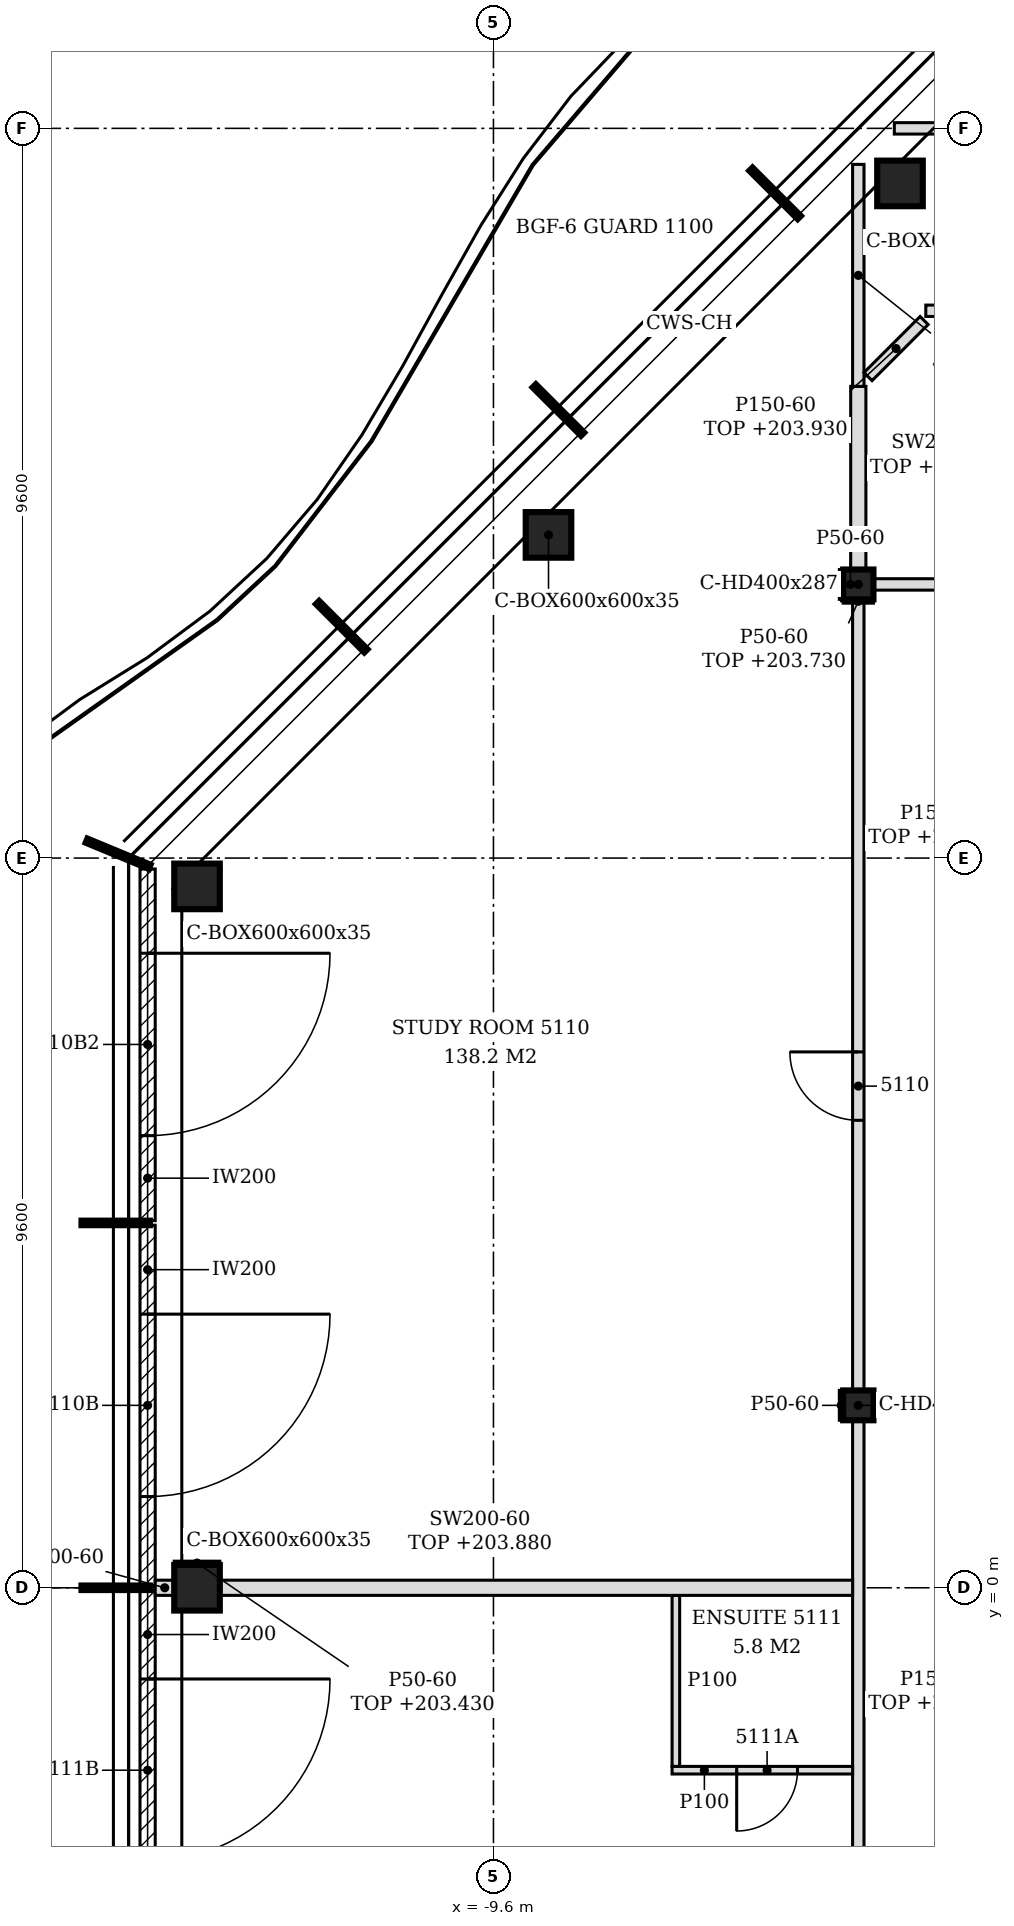
"""IFC4 building model, lengths in metres.
Left out: names, types, materials, properties, quantities, classifications, styles, units other than length and angle.
Written with IfcOpenShell. Run it as: python <this file> out.ifc"""

import sys

from ifc_helpers import new_model, si_unit, direction, frame, frame_2d, origin, origin_2d, place, context, subcontext, project, spatial, polyline, rectangle, hollow_rectangle, i_section, outline, extrude, clip, halfspace, element, fill, save


model = new_model("IFC4")
c1 = context("Model", 3, precision=1e-05, world=origin(), true_north=direction((0.0, 1.0)))
c2 = subcontext(c1, "Body", "Model", "MODEL_VIEW")
j1 = project(units=[si_unit("LENGTHUNIT", "METRE"), si_unit("PLANEANGLEUNIT", "RADIAN")], contexts=[c1])
p1 = place(None, origin())
s1 = spatial("IfcSite", under=j1, at=p1, CompositionType="ELEMENT")
p2 = place(p1, origin())
s2 = spatial("IfcBuilding", under=s1, at=p2, CompositionType="ELEMENT")
p3 = place(p2, frame((0.0, 0.0, 201.0)))
s3 = spatial("IfcBuildingStorey", under=s2, at=p3, CompositionType="ELEMENT", Elevation=201.0)
for number, where, z_axis, x_axis in (
    (1, (-4.251, 18.476, -0.15), (0.0, 0.0, 1.0), (1.0, 0.0, 0.0)),
    (2, (-8.876, 13.852, -0.15), (0.0, 0.0, 1.0), (1.0, 0.0, 0.0)),
    (3, (-13.5, 9.227, -0.15), (0.0, 0.0, 1.0), (1.0, 0.0, 0.0)),
):
    element("IfcColumn", number, at=place(p3, frame(where, z_axis=z_axis, x_axis=x_axis)), inside=s3, PredefinedType="COLUMN", context=c2, shape_type="Clipping", body=[
        clip(clip(extrude(hollow_rectangle(XDim=0.6, YDim=0.6, WallThickness=0.035, at=origin_2d()), origin(), (0.0, 0.0, 1.0), 3.5), halfspace(frame((0.0, 0.0, 0.011), z_axis=(0.0, 0.0, 1.0), x_axis=(1.0, 0.0, 0.0)), True)), halfspace(frame((0.0, 0.0, 3.095), z_axis=(0.0, 0.0, 1.0), x_axis=(1.0, 0.0, 0.0)), False)),
    ])
p4 = place(p3, frame((-13.5, 0.0, -0.15), z_axis=(0.0, 0.0, 1.0), x_axis=(1.0, 0.0, 0.0)))
e4 = element("IfcColumn", 4, at=p4, inside=s3, PredefinedType="COLUMN", context=c2, shape_type="Clipping", body=[
    clip(extrude(hollow_rectangle(XDim=0.6, YDim=0.6, WallThickness=0.035, at=origin_2d()), origin(), (0.0, 0.0, 1.0), 3.5), halfspace(frame((0.0, 0.0, 0.011), z_axis=(0.0, 0.0, 1.0), x_axis=(1.0, 0.0, 0.0)), True)),
])
for number, where, z_axis, x_axis in (
    (5, (-4.8, 2.4, -0.15), (0.0, 0.0, 1.0), (1.0, 0.0, 0.0)),
    (6, (-4.8, 13.2, -0.15), (0.0, 0.0, 1.0), (1.0, 0.0, 0.0)),
):
    element("IfcColumn", number, at=place(p3, frame(where, z_axis=z_axis, x_axis=x_axis)), inside=s3, PredefinedType="COLUMN", context=c2, shape_type="SweptSolid", body=[
        extrude(i_section(OverallWidth=0.399, OverallDepth=0.393, WebThickness=0.023, FlangeThickness=0.037, FilletRadius=0.015, at=origin_2d()), origin(), (0.0, 0.0, 1.0), 3.5),
    ])
p5 = place(p3, frame((-14.15, 9.457, 0.0), z_axis=(0.0, 0.0, 1.0), x_axis=(0.0, -1.0, 0.0)))
e7 = element("IfcWall", 7, at=p5, inside=s3, PredefinedType="NOTDEFINED", context=c2, shape_type="SweptSolid", body=[
    extrude(rectangle(XDim=4.626, YDim=0.2, at=frame_2d((2.313, 0.0))), origin(), (0.0, 0.0, 1.0), 3.35),
])
p6 = place(p5, frame((1.108, 0.0, 0.0)))
e8 = element("IfcOpeningElement", 8, at=p6, cuts=e7, PredefinedType="OPENING", context=c2, shape_type="SweptSolid", body=[
    extrude(rectangle(XDim=2.4, YDim=2.4, at=frame_2d((1.2, 1.2))), frame((0.0, 0.11, 0.0), z_axis=(0.0, -1.0, 0.0), x_axis=(1.0, 0.0, 0.0)), (0.0, 0.0, 1.0), 0.22),
])
p7 = place(p3, frame((-14.15, 4.77, 0.0), z_axis=(0.0, 0.0, 1.0), x_axis=(0.0, -1.0, 0.0)))
e9 = element("IfcWall", 9, at=p7, inside=s3, PredefinedType="NOTDEFINED", context=c2, shape_type="SweptSolid", body=[
    extrude(rectangle(XDim=4.74, YDim=0.2, at=frame_2d((2.37, 0.0))), origin(), (0.0, 0.0, 1.0), 3.35),
])
p8 = place(p7, frame((1.17, 0.0, 0.0)))
e10 = element("IfcOpeningElement", 10, at=p8, cuts=e9, PredefinedType="OPENING", context=c2, shape_type="SweptSolid", body=[
    extrude(rectangle(XDim=2.4, YDim=2.4, at=frame_2d((1.2, 1.2))), frame((0.0, 0.11, 0.0), z_axis=(0.0, -1.0, 0.0), x_axis=(1.0, 0.0, 0.0)), (0.0, 0.0, 1.0), 0.22),
])
p9 = place(p3, frame((-14.15, -0.03, 0.0), z_axis=(0.0, 0.0, 1.0), x_axis=(0.0, -1.0, 0.0)))
e11 = element("IfcWall", 11, at=p9, inside=s3, PredefinedType="NOTDEFINED", context=c2, shape_type="SweptSolid", body=[
    extrude(rectangle(XDim=4.74, YDim=0.2, at=frame_2d((2.37, 0.0))), origin(), (0.0, 0.0, 1.0), 3.35),
])
p10 = place(p9, frame((1.17, 0.0, 0.0)))
e12 = element("IfcOpeningElement", 12, at=p10, cuts=e11, PredefinedType="OPENING", context=c2, shape_type="SweptSolid", body=[
    extrude(rectangle(XDim=2.4, YDim=2.4, at=frame_2d((1.2, 1.2))), frame((0.0, 0.11, 0.0), z_axis=(0.0, -1.0, 0.0), x_axis=(1.0, 0.0, 0.0)), (0.0, 0.0, 1.0), 0.22),
])
p11 = place(p3, frame((-4.8, -8.204, 0.0), z_axis=(0.0, 0.0, 1.0), x_axis=(0.0, 1.0, 0.0)))
e13 = element("IfcWall", 13, at=p11, inside=s3, PredefinedType="PARTITIONING", context=c2, shape_type="SweptSolid", body=[
    extrude(rectangle(XDim=10.407, YDim=0.15, at=frame_2d((5.204, 0.0))), origin(), (0.0, 0.0, 1.0), 2.73),
])
p12 = place(p11, frame((2.354, 0.0, 0.0)))
e14 = element("IfcOpeningElement", 14, at=p12, cuts=e13, PredefinedType="OPENING", context=c2, shape_type="SweptSolid", body=[
    extrude(rectangle(XDim=0.9, YDim=2.1, at=frame_2d((0.45, 1.05))), frame((0.0, 0.085, 0.0), z_axis=(0.0, -1.0, 0.0), x_axis=(1.0, 0.0, 0.0)), (0.0, 0.0, 1.0), 0.17),
])
p13 = place(p3, frame((-7.25, -2.4, 0.0), z_axis=(0.0, 0.0, 1.0), x_axis=(1.0, 0.0, 0.0)))
e15 = element("IfcWall", 15, at=p13, inside=s3, PredefinedType="PARTITIONING", context=c2, shape_type="SweptSolid", body=[
    extrude(outline(polyline([(0.0, 0.0), (2.375, 0.0), (2.375, 2.73), (2.3, 2.73), (2.298, 3.35), (0.0, 3.35), (0.0, 0.0)])), frame((0.0, 0.05, 0.0), z_axis=(0.0, -1.0, 0.0), x_axis=(1.0, 0.0, 0.0)), (0.0, 0.0, 1.0), 0.1),
])
p14 = place(p13, frame((0.85, 0.0, 0.0)))
e16 = element("IfcOpeningElement", 16, at=p14, cuts=e15, PredefinedType="OPENING", context=c2, shape_type="SweptSolid", body=[
    extrude(rectangle(XDim=0.8, YDim=2.1, at=frame_2d((0.4, 1.05))), frame((0.0, 0.06, 0.0), z_axis=(0.0, -1.0, 0.0), x_axis=(1.0, 0.0, 0.0)), (0.0, 0.0, 1.0), 0.12),
])
p15 = place(p3, frame((-7.2, -2.35, 0.0), z_axis=(0.0, 0.0, 1.0), x_axis=(0.0, 1.0, 0.0)))
e17 = element("IfcWall", 17, at=p15, inside=s3, PredefinedType="PARTITIONING", context=c2, shape_type="SweptSolid", body=[
    extrude(rectangle(XDim=2.25, YDim=0.1, at=frame_2d((1.125, 0.0))), origin(), (0.0, 0.0, 1.0), 3.35),
])
p16 = place(p3, frame((-14.05, 0.0, 0.0), z_axis=(0.0, 0.0, 1.0), x_axis=(1.0, 0.0, 0.0)))
e18 = element("IfcWall", 18, at=p16, inside=s3, PredefinedType="PARTITIONING", context=c2, shape_type="SweptSolid", body=[
    extrude(outline(polyline([(0.0, 0.0), (0.25, 0.0), (0.25, 2.43), (0.1, 2.43), (0.098, 3.35), (0.0, 3.35), (0.0, 0.0)])), frame((0.0, 0.1, 0.0), z_axis=(0.0, -1.0, 0.0), x_axis=(1.0, 0.0, 0.0)), (0.0, 0.0, 1.0), 0.2),
])
p17 = place(p3, frame((-13.2, 0.0, 0.0), z_axis=(0.0, 0.0, 1.0), x_axis=(1.0, 0.0, 0.0)))
e19 = element("IfcWall", 19, at=p17, inside=s3, PredefinedType="PARTITIONING", context=c2, shape_type="SweptSolid", body=[
    extrude(outline(polyline([(0.0, 0.0), (8.325, 0.0), (8.325, 2.73), (8.25, 2.73), (8.248, 2.88), (0.15, 2.88), (0.148, 2.43), (0.0, 2.43), (0.0, 0.0)])), frame((0.0, 0.1, 0.0), z_axis=(0.0, -1.0, 0.0), x_axis=(1.0, 0.0, 0.0)), (0.0, 0.0, 1.0), 0.2),
])
p18 = place(p3, frame((-4.8, 2.596, 0.0), z_axis=(0.0, 0.0, 1.0), x_axis=(0.0, 1.0, 0.0)))
e20 = element("IfcWall", 20, at=p18, inside=s3, PredefinedType="PARTITIONING", context=c2, shape_type="SweptSolid", body=[
    extrude(rectangle(XDim=10.407, YDim=0.15, at=frame_2d((5.204, 0.0))), origin(), (0.0, 0.0, 1.0), 2.73),
])
p19 = place(p18, frame((3.553, 0.0, 0.0)))
e21 = element("IfcOpeningElement", 21, at=p19, cuts=e20, PredefinedType="OPENING", context=c2, shape_type="SweptSolid", body=[
    extrude(rectangle(XDim=0.9, YDim=2.1, at=frame_2d((0.45, 1.05))), frame((0.0, 0.085, 0.0), z_axis=(0.0, -1.0, 0.0), x_axis=(1.0, 0.0, 0.0)), (0.0, 0.0, 1.0), 0.17),
])
p20 = place(p3, frame((-4.601, 13.2, 0.0), z_axis=(0.0, 0.0, 1.0), x_axis=(1.0, 0.0, 0.0)))
e22 = element("IfcWall", 22, at=p20, inside=s3, PredefinedType="PARTITIONING", context=c2, shape_type="SweptSolid", body=[
    extrude(rectangle(XDim=9.476, YDim=0.15, at=frame_2d((4.738, 0.0))), origin(), (0.0, 0.0, 1.0), 2.73),
])
p21 = place(p20, frame((4.15, 0.0, 0.0)))
e23 = element("IfcOpeningElement", 23, at=p21, cuts=e22, PredefinedType="OPENING", context=c2, shape_type="SweptSolid", body=[
    extrude(rectangle(XDim=0.9, YDim=2.1, at=frame_2d((0.45, 1.05))), frame((0.0, 0.085, 0.0), z_axis=(0.0, -1.0, 0.0), x_axis=(1.0, 0.0, 0.0)), (0.0, 0.0, 1.0), 0.17),
])
p22 = place(p3, frame((-4.8, 13.396, 0.0), z_axis=(0.0, 0.0, 1.0), x_axis=(0.0, 1.0, 0.0)))
e24 = element("IfcWall", 24, at=p22, inside=s3, PredefinedType="PARTITIONING", context=c2, shape_type="SweptSolid", body=[
    extrude(rectangle(XDim=2.409, YDim=0.2, at=frame_2d((1.205, 0.0))), origin(), (0.0, 0.0, 1.0), 2.93),
])
p23 = place(p3, frame((-4.8, 15.806, 0.0), z_axis=(0.0, 0.0, 1.0), x_axis=(0.0, 1.0, 0.0)))
e25 = element("IfcWall", 25, at=p23, inside=s3, PredefinedType="PARTITIONING", context=c2, shape_type="SweptSolid", body=[
    extrude(outline(polyline([(0.0, 0.0), (2.92, 0.0), (2.92, 2.93), (2.833, 2.93), (2.831, 2.43), (1.41, 2.43), (1.408, 2.93), (0.0, 2.93), (0.0, 0.0)])), frame((0.0, 0.075, 0.0), z_axis=(0.0, -1.0, 0.0), x_axis=(1.0, 0.0, 0.0)), (0.0, 0.0, 1.0), 0.15),
])
p24 = place(p3, frame((-4.672, 15.934, 0.0), z_axis=(0.0, 0.0, 1.0), x_axis=(0.707106781187, 0.707106781187, 0.0)))
e26 = element("IfcWall", 26, at=p24, inside=s3, PredefinedType="PARTITIONING", context=c2, shape_type="SweptSolid", body=[
    extrude(rectangle(XDim=1.044, YDim=0.15, at=frame_2d((0.522, 0.0))), origin(), (0.0, 0.0, 1.0), 2.93),
])
p25 = place(p3, frame((-3.912, 16.8, 0.0), z_axis=(0.0, 0.0, 1.0), x_axis=(1.0, 0.0, 0.0)))
e27 = element("IfcWall", 27, at=p25, inside=s3, PredefinedType="PARTITIONING", context=c2, shape_type="SweptSolid", body=[
    extrude(rectangle(XDim=8.787, YDim=0.15, at=frame_2d((4.394, 0.0))), origin(), (0.0, 0.0, 1.0), 3.35),
])
p26 = place(p3, frame((-4.326, 19.2, 0.0), z_axis=(0.0, 0.0, 1.0), x_axis=(1.0, 0.0, 0.0)))
e28 = element("IfcWall", 28, at=p26, inside=s3, PredefinedType="PARTITIONING", context=c2, shape_type="SweptSolid", body=[
    extrude(outline(polyline([(0.0, 0.0), (31.244, 0.0), (31.244, 2.552), (23.677, 2.552), (23.675, 2.322), (23.375, 2.322), (23.373, 2.552), (1.51, 2.552), (1.508, 2.43), (0.087, 2.43), (0.085, 2.552), (0.0, 2.552), (0.0, 0.0)])), frame((0.0, 0.075, 0.0), z_axis=(0.0, -1.0, 0.0), x_axis=(1.0, 0.0, 0.0)), (0.0, 0.0, 1.0), 0.15),
])
p27 = place(p26, frame((28.02, 0.0, 0.0)))
e29 = element("IfcOpeningElement", 29, at=p27, cuts=e28, PredefinedType="OPENING", context=c2, shape_type="SweptSolid", body=[
    extrude(rectangle(XDim=0.9, YDim=2.1, at=frame_2d((0.45, 1.05))), frame((0.0, 0.085, 0.0), z_axis=(0.0, -1.0, 0.0), x_axis=(1.0, 0.0, 0.0)), (0.0, 0.0, 1.0), 0.17),
])
p28 = place(p26, frame((19.776, 0.0, 0.0)))
e30 = element("IfcOpeningElement", 30, at=p28, cuts=e28, PredefinedType="OPENING", context=c2, shape_type="SweptSolid", body=[
    extrude(rectangle(XDim=0.9, YDim=2.1, at=frame_2d((0.45, 1.05))), frame((0.0, 0.085, 0.0), z_axis=(0.0, -1.0, 0.0), x_axis=(1.0, 0.0, 0.0)), (0.0, 0.0, 1.0), 0.17),
])
p29 = place(p26, frame((5.138, 0.0, 0.0)))
e31 = element("IfcOpeningElement", 31, at=p29, cuts=e28, PredefinedType="OPENING", context=c2, shape_type="SweptSolid", body=[
    extrude(rectangle(XDim=0.9, YDim=2.1, at=frame_2d((0.45, 1.05))), frame((0.0, 0.085, 0.0), z_axis=(0.0, -1.0, 0.0), x_axis=(1.0, 0.0, 0.0)), (0.0, 0.0, 1.0), 0.17),
])
p30 = place(p3, frame((-5.024, 2.204, 0.0), z_axis=(0.0, 0.0, 1.0), x_axis=(0.0, 1.0, 0.0)))
e32 = element("IfcWall", 32, at=p30, inside=s3, PredefinedType="PARTITIONING", context=c2, shape_type="SweptSolid", body=[
    extrude(rectangle(XDim=0.393, YDim=0.05, at=frame_2d((0.196, 0.0))), origin(), (0.0, 0.0, 1.0), 3.35),
])
p31 = place(p3, frame((-5.024, 13.003, 0.0), z_axis=(0.0, 0.0, 1.0), x_axis=(0.0, 1.0, 0.0)))
e33 = element("IfcWall", 33, at=p31, inside=s3, PredefinedType="PARTITIONING", context=c2, shape_type="SweptSolid", body=[
    extrude(rectangle(XDim=0.393, YDim=0.05, at=frame_2d((0.197, 0.0))), origin(), (0.0, 0.0, 1.0), 3.35),
])
p32 = place(p3, frame((-13.8, 0.325, 0.0), z_axis=(0.0, 0.0, 1.0), x_axis=(1.0, 0.0, 0.0)))
e34 = element("IfcWall", 34, at=p32, inside=s3, PredefinedType="PARTITIONING", context=c2, shape_type="SweptSolid", body=[
    extrude(rectangle(XDim=0.6, YDim=0.05, at=frame_2d((0.3, 0.0))), origin(), (0.0, 0.0, 1.0), 2.43),
])
p33 = place(p3, frame((-5.0, 12.979, 0.0), z_axis=(0.0, 0.0, 1.0), x_axis=(1.0, 0.0, 0.0)))
e35 = element("IfcWall", 35, at=p33, inside=s3, PredefinedType="PARTITIONING", context=c2, shape_type="SweptSolid", body=[
    extrude(rectangle(XDim=0.399, YDim=0.05, at=frame_2d((0.199, 0.0))), origin(), (0.0, 0.0, 1.0), 2.73),
])
p34 = place(p6, origin())
e36 = element("IfcDoor", 36, at=p34, inside=s3, OperationType="SINGLE_SWING_LEFT", PredefinedType="DOOR", context=c2, shape_type="SweptSolid", body=[
    extrude(rectangle(XDim=2.4, YDim=2.4, at=frame_2d((1.2, 1.2))), frame((0.0, 0.025, 0.0), z_axis=(0.0, -1.0, 0.0), x_axis=(1.0, 0.0, 0.0)), (0.0, 0.0, 1.0), 0.05),
])
fill(e8, e36)
p35 = place(p8, origin())
e37 = element("IfcDoor", 37, at=p35, inside=s3, OperationType="SINGLE_SWING_LEFT", PredefinedType="DOOR", context=c2, shape_type="SweptSolid", body=[
    extrude(rectangle(XDim=2.4, YDim=2.4, at=frame_2d((1.2, 1.2))), frame((0.0, 0.025, 0.0), z_axis=(0.0, -1.0, 0.0), x_axis=(1.0, 0.0, 0.0)), (0.0, 0.0, 1.0), 0.05),
])
fill(e10, e37)
p36 = place(p10, origin())
e38 = element("IfcDoor", 38, at=p36, inside=s3, OperationType="SINGLE_SWING_LEFT", PredefinedType="DOOR", context=c2, shape_type="SweptSolid", body=[
    extrude(rectangle(XDim=2.4, YDim=2.4, at=frame_2d((1.2, 1.2))), frame((0.0, 0.025, 0.0), z_axis=(0.0, -1.0, 0.0), x_axis=(1.0, 0.0, 0.0)), (0.0, 0.0, 1.0), 0.05),
])
fill(e12, e38)
p37 = place(p19, origin())
e39 = element("IfcDoor", 39, at=p37, inside=s3, OperationType="SINGLE_SWING_RIGHT", PredefinedType="DOOR", context=c2, shape_type="SweptSolid", body=[
    extrude(rectangle(XDim=0.9, YDim=2.1, at=frame_2d((0.45, 1.05))), frame((0.0, 0.025, 0.0), z_axis=(0.0, -1.0, 0.0), x_axis=(1.0, 0.0, 0.0)), (0.0, 0.0, 1.0), 0.05),
])
fill(e21, e39)
p38 = place(p14, frame((0.8, 0.0, 0.0), z_axis=(0.0, 0.0, 1.0), x_axis=(-1.0, 0.0, 0.0)))
e40 = element("IfcDoor", 40, at=p38, inside=s3, OperationType="SINGLE_SWING_RIGHT", PredefinedType="DOOR", context=c2, shape_type="SweptSolid", body=[
    extrude(rectangle(XDim=0.8, YDim=2.1, at=frame_2d((0.4, 1.05))), frame((0.0, 0.025, 0.0), z_axis=(0.0, -1.0, 0.0), x_axis=(1.0, 0.0, 0.0)), (0.0, 0.0, 1.0), 0.05),
])
fill(e16, e40)
save(model, sys.argv[1])
